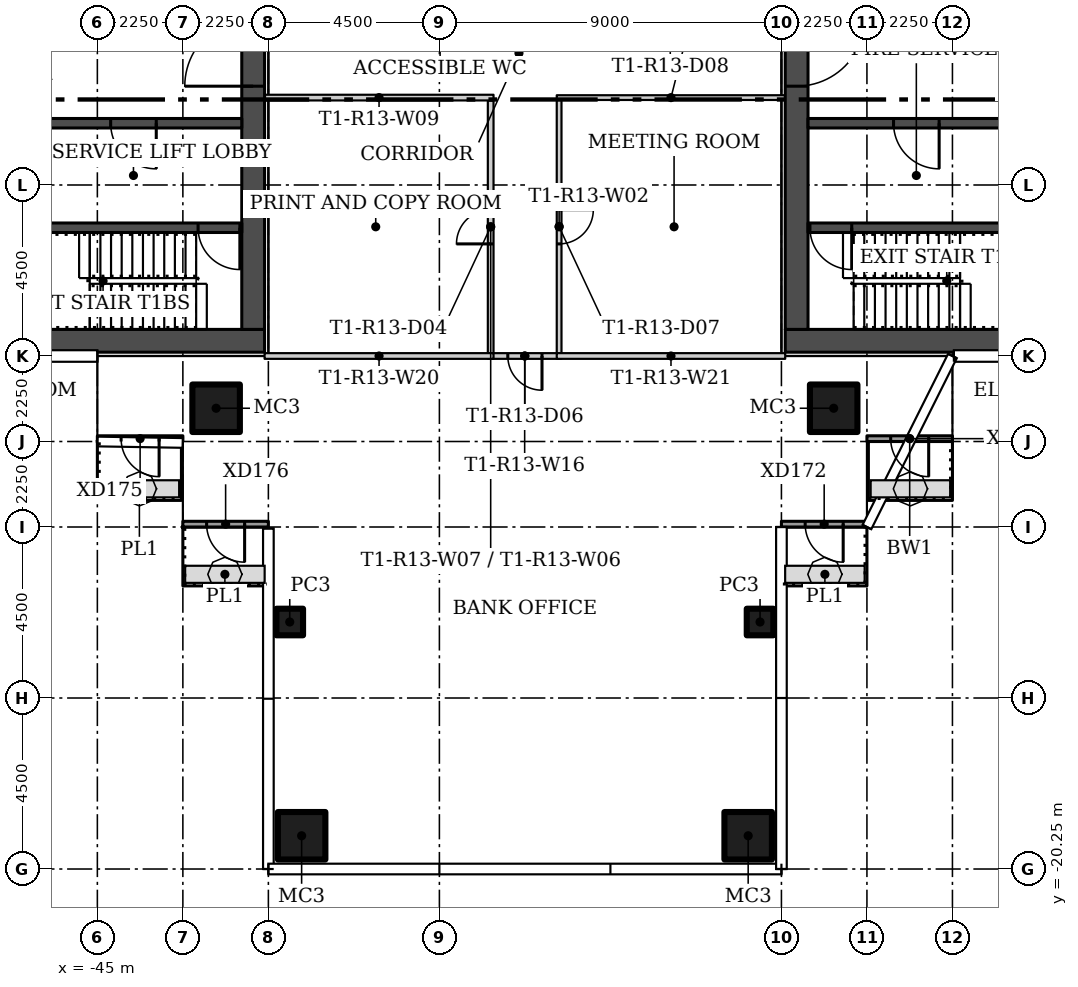
"""IFC4 building model, lengths in metres.
Left out: names, types, materials, properties, quantities, classifications, styles, units other than length and angle.
Written with IfcOpenShell. Run it as: python <this file> out.ifc"""

import sys

from ifc_helpers import new_model, si_unit, direction, frame, frame_2d, origin, origin_2d, place, context, subcontext, project, spatial, rectangle, hollow_rectangle, extrude, element, fill, save


model = new_model("IFC4")
c1 = context("Model", 3, precision=1e-05, world=origin(), true_north=direction((0.0, 1.0)))
c2 = subcontext(c1, "Body", "Model", "MODEL_VIEW")
j1 = project(units=[si_unit("LENGTHUNIT", "METRE"), si_unit("PLANEANGLEUNIT", "RADIAN")], contexts=[c1])
p1 = place(None, origin())
s1 = spatial("IfcSite", under=j1, at=p1, CompositionType="ELEMENT")
p2 = place(p1, origin())
s2 = spatial("IfcBuilding", under=s1, at=p2, CompositionType="ELEMENT")
p3 = place(p2, frame((0.0, 0.0, 120.9)))
s3 = spatial("IfcBuildingStorey", under=s2, at=p3, CompositionType="ELEMENT", Elevation=120.9)
for number, where in (
    (1, (-25.625, -8.125, 0.0)),
    (2, (-41.875, -8.125, 0.0)),
):
    element("IfcColumn", number, at=place(p3, frame(where)), inside=s3, PredefinedType="COLUMN", context=c2, shape_type="SweptSolid", body=[
        extrude(hollow_rectangle(XDim=1.25, YDim=1.25, WallThickness=0.05, at=origin_2d()), origin(), (0.0, 0.0, 1.0), 3.55),
    ])
p4 = place(p3, frame((-39.938, -13.75, 0.0)))
e3 = element("IfcColumn", 3, at=p4, inside=s3, PredefinedType="COLUMN", context=c2, shape_type="SweptSolid", body=[
    extrude(hollow_rectangle(XDim=0.7, YDim=0.7, WallThickness=0.025, at=origin_2d()), origin(), (0.0, 0.0, 1.0), 3.55),
])
p5 = place(p3, frame((-39.625, -19.375, 0.0)))
e4 = element("IfcColumn", 4, at=p5, inside=s3, PredefinedType="COLUMN", context=c2, shape_type="SweptSolid", body=[
    extrude(hollow_rectangle(XDim=1.25, YDim=1.25, WallThickness=0.05, at=origin_2d()), origin(), (0.0, 0.0, 1.0), 3.55),
])
p6 = place(p3, frame((-27.562, -13.75, 0.0)))
e5 = element("IfcColumn", 5, at=p6, inside=s3, PredefinedType="COLUMN", context=c2, shape_type="SweptSolid", body=[
    extrude(hollow_rectangle(XDim=0.7, YDim=0.7, WallThickness=0.025, at=origin_2d()), origin(), (0.0, 0.0, 1.0), 3.55),
])
p7 = place(p3, frame((-27.875, -19.375, 0.0)))
e6 = element("IfcColumn", 6, at=p7, inside=s3, PredefinedType="COLUMN", context=c2, shape_type="SweptSolid", body=[
    extrude(hollow_rectangle(XDim=1.25, YDim=1.25, WallThickness=0.05, at=origin_2d()), origin(), (0.0, 0.0, 1.0), 3.55),
])
p8 = place(p3, frame((-32.85, -0.013, 0.0), z_axis=(0.0, 0.0, 1.0), x_axis=(0.0, -1.0, 0.0)))
e7 = element("IfcWall", 7, at=p8, inside=s3, PredefinedType="PARTITIONING", context=c2, shape_type="SweptSolid", body=[
    extrude(rectangle(XDim=6.662, YDim=0.125, at=frame_2d((3.331, 0.0))), origin(), (0.0, 0.0, 1.0), 3.55),
])
p9 = place(p8, frame((2.887, 0.0, 0.0)))
e8 = element("IfcOpeningElement", 8, at=p9, cuts=e7, PredefinedType="OPENING", context=c2, shape_type="SweptSolid", body=[
    extrude(rectangle(XDim=0.9, YDim=2.1, at=frame_2d((0.45, 1.05))), frame((0.0, 0.073, 0.0), z_axis=(0.0, -1.0, 0.0), x_axis=(1.0, 0.0, 0.0)), (0.0, 0.0, 1.0), 0.145),
])
p10 = place(p3, frame((-26.9, 0.05, 0.0), z_axis=(0.0, 0.0, 1.0), x_axis=(-1.0, 0.0, 0.0)))
e9 = element("IfcWall", 9, at=p10, inside=s3, PredefinedType="PARTITIONING", context=c2, shape_type="SweptSolid", body=[
    extrude(rectangle(XDim=6.012, YDim=0.125, at=frame_2d((3.006, 0.0))), origin(), (0.0, 0.0, 1.0), 3.55),
])
p11 = place(p3, frame((-34.65, -6.675, 0.0), z_axis=(0.0, 0.0, 1.0), x_axis=(0.0, 1.0, 0.0)))
e10 = element("IfcWall", 10, at=p11, inside=s3, PredefinedType="PARTITIONING", context=c2, shape_type="SweptSolid", body=[
    extrude(rectangle(XDim=6.65, YDim=0.15, at=frame_2d((3.325, 0.0))), origin(), (0.0, 0.0, 1.0), 3.55),
])
p12 = place(p11, frame((2.875, 0.0, 0.0)))
e11 = element("IfcOpeningElement", 11, at=p12, cuts=e10, PredefinedType="OPENING", context=c2, shape_type="SweptSolid", body=[
    extrude(rectangle(XDim=0.9, YDim=2.1, at=frame_2d((0.45, 1.05))), frame((0.0, 0.085, 0.0), z_axis=(0.0, -1.0, 0.0), x_axis=(1.0, 0.0, 0.0)), (0.0, 0.0, 1.0), 0.17),
])
p13 = place(p3, frame((-34.575, 0.05, 0.0), z_axis=(0.0, 0.0, 1.0), x_axis=(-1.0, 0.0, 0.0)))
e12 = element("IfcWall", 12, at=p13, inside=s3, PredefinedType="PARTITIONING", context=c2, shape_type="SweptSolid", body=[
    extrude(rectangle(XDim=6.025, YDim=0.15, at=frame_2d((3.012, 0.0))), origin(), (0.0, 0.0, 1.0), 3.55),
])
p14 = place(p3, frame((-32.787, -6.75, 0.0), z_axis=(0.0, 0.0, 1.0), x_axis=(-1.0, 0.0, 0.0)))
e13 = element("IfcWall", 13, at=p14, inside=s3, PredefinedType="PARTITIONING", context=c2, shape_type="SweptSolid", body=[
    extrude(rectangle(XDim=1.938, YDim=0.15, at=frame_2d((0.969, 0.0))), origin(), (0.0, 0.0, 1.0), 3.55),
])
p15 = place(p14, frame((0.513, 0.0, 0.0)))
e14 = element("IfcOpeningElement", 14, at=p15, cuts=e13, PredefinedType="OPENING", context=c2, shape_type="SweptSolid", body=[
    extrude(rectangle(XDim=0.9, YDim=2.1, at=frame_2d((0.45, 1.05))), frame((0.0, 0.085, 0.0), z_axis=(0.0, -1.0, 0.0), x_axis=(1.0, 0.0, 0.0)), (0.0, 0.0, 1.0), 0.17),
])
p16 = place(p3, frame((-40.6, -6.75, 0.0)))
e15 = element("IfcWall", 15, at=p16, inside=s3, PredefinedType="PARTITIONING", context=c2, shape_type="SweptSolid", body=[
    extrude(rectangle(XDim=6.025, YDim=0.15, at=frame_2d((3.012, 0.0))), origin(), (0.0, 0.0, 1.0), 3.55),
])
p17 = place(p3, frame((-32.912, -6.75, 0.0)))
e16 = element("IfcWall", 16, at=p17, inside=s3, PredefinedType="PARTITIONING", context=c2, shape_type="SweptSolid", body=[
    extrude(rectangle(XDim=6.012, YDim=0.15, at=frame_2d((3.006, 0.0))), origin(), (0.0, 0.0, 1.0), 3.55),
])
p18 = place(p3, frame((-22.5, -8.925, 0.0), z_axis=(0.0, 0.0, 1.0), x_axis=(-1.0, 0.0, 0.0)))
e17 = element("IfcWall", 17, at=p18, inside=s3, PredefinedType="SOLIDWALL", context=c2, shape_type="SweptSolid", body=[
    extrude(rectangle(XDim=2.25, YDim=0.15, at=frame_2d((1.125, 0.0))), origin(), (0.0, 0.0, 1.0), 3.45),
])
p19 = place(p18, frame((0.625, 0.0, 0.0)))
e18 = element("IfcOpeningElement", 18, at=p19, cuts=e17, PredefinedType="OPENING", context=c2, shape_type="SweptSolid", body=[
    extrude(rectangle(XDim=1.0, YDim=2.4, at=frame_2d((0.5, 1.2))), frame((0.0, 0.085, 0.0), z_axis=(0.0, -1.0, 0.0), x_axis=(1.0, 0.0, 0.0)), (0.0, 0.0, 1.0), 0.17),
])
p20 = place(p3, frame((-24.75, -11.175, 0.0), z_axis=(0.0, 0.0, 1.0), x_axis=(-1.0, 0.0, 0.0)))
e19 = element("IfcWall", 19, at=p20, inside=s3, PredefinedType="SOLIDWALL", context=c2, shape_type="SweptSolid", body=[
    extrude(rectangle(XDim=2.25, YDim=0.15, at=frame_2d((1.125, 0.0))), origin(), (0.0, 0.0, 1.0), 3.45),
])
p21 = place(p20, frame((0.625, 0.0, 0.0)))
e20 = element("IfcOpeningElement", 20, at=p21, cuts=e19, PredefinedType="OPENING", context=c2, shape_type="SweptSolid", body=[
    extrude(rectangle(XDim=1.0, YDim=2.4, at=frame_2d((0.5, 1.2))), frame((0.0, 0.085, 0.0), z_axis=(0.0, -1.0, 0.0), x_axis=(1.0, 0.0, 0.0)), (0.0, 0.0, 1.0), 0.17),
])
p22 = place(p3, frame((-42.75, -8.925, 0.0), z_axis=(0.0, 0.0, 1.0), x_axis=(-1.0, 0.0, 0.0)))
e21 = element("IfcWall", 21, at=p22, inside=s3, PredefinedType="SOLIDWALL", context=c2, shape_type="SweptSolid", body=[
    extrude(rectangle(XDim=2.25, YDim=0.15, at=frame_2d((1.125, 0.0))), origin(), (0.0, 0.0, 1.0), 3.45),
])
p23 = place(p22, frame((0.625, 0.0, 0.0)))
e22 = element("IfcOpeningElement", 22, at=p23, cuts=e21, PredefinedType="OPENING", context=c2, shape_type="SweptSolid", body=[
    extrude(rectangle(XDim=1.0, YDim=2.4, at=frame_2d((0.5, 1.2))), frame((0.0, 0.085, 0.0), z_axis=(0.0, -1.0, 0.0), x_axis=(1.0, 0.0, 0.0)), (0.0, 0.0, 1.0), 0.17),
])
p24 = place(p3, frame((-40.5, -11.175, 0.0), z_axis=(0.0, 0.0, 1.0), x_axis=(-1.0, 0.0, 0.0)))
e23 = element("IfcWall", 23, at=p24, inside=s3, PredefinedType="SOLIDWALL", context=c2, shape_type="SweptSolid", body=[
    extrude(rectangle(XDim=2.25, YDim=0.15, at=frame_2d((1.125, 0.0))), origin(), (0.0, 0.0, 1.0), 3.45),
])
p25 = place(p24, frame((0.625, 0.0, 0.0)))
e24 = element("IfcOpeningElement", 24, at=p25, cuts=e23, PredefinedType="OPENING", context=c2, shape_type="SweptSolid", body=[
    extrude(rectangle(XDim=1.0, YDim=2.4, at=frame_2d((0.5, 1.2))), frame((0.0, 0.085, 0.0), z_axis=(0.0, -1.0, 0.0), x_axis=(1.0, 0.0, 0.0)), (0.0, 0.0, 1.0), 0.17),
])
p26 = place(p3, frame((-26.9, -6.35, 0.0)))
e25 = element("IfcWall", 25, at=p26, inside=s3, PredefinedType="SHEAR", context=c2, shape_type="SweptSolid", body=[
    extrude(rectangle(XDim=13.3, YDim=0.6, at=frame_2d((6.65, 0.0))), origin(), (0.0, 0.0, 1.0), 3.55),
])
p27 = place(p3, frame((-26.6, 6.05, 0.0), z_axis=(0.0, 0.0, 1.0), x_axis=(0.0, -1.0, 0.0)))
e26 = element("IfcWall", 26, at=p27, inside=s3, PredefinedType="SHEAR", context=c2, shape_type="SweptSolid", body=[
    extrude(rectangle(XDim=12.1, YDim=0.6, at=frame_2d((6.05, 0.0))), origin(), (0.0, 0.0, 1.0), 3.55),
])
p28 = place(p27, frame((3.9, 0.0, 0.0)))
e27 = element("IfcOpeningElement", 27, at=p28, cuts=e26, PredefinedType="OPENING", context=c2, shape_type="SweptSolid", body=[
    extrude(rectangle(XDim=1.8, YDim=2.4, at=frame_2d((0.9, 1.2))), frame((0.0, 0.31, 0.0), z_axis=(0.0, -1.0, 0.0), x_axis=(1.0, 0.0, 0.0)), (0.0, 0.0, 1.0), 0.62),
])
p29 = place(p3, frame((-14.2, -3.375, 0.0), z_axis=(0.0, 0.0, 1.0), x_axis=(-1.0, 0.0, 0.0)))
e28 = element("IfcWall", 28, at=p29, inside=s3, PredefinedType="SHEAR", context=c2, shape_type="SweptSolid", body=[
    extrude(rectangle(XDim=12.1, YDim=0.25, at=frame_2d((6.05, 0.0))), origin(), (0.0, 0.0, 1.0), 3.55),
])
p30 = place(p29, frame((10.95, 0.0, 0.0)))
e29 = element("IfcOpeningElement", 29, at=p30, cuts=e28, PredefinedType="OPENING", context=c2, shape_type="SweptSolid", body=[
    extrude(rectangle(XDim=1.1, YDim=2.1, at=frame_2d((0.55, 1.05))), frame((0.0, 0.135, 0.0), z_axis=(0.0, -1.0, 0.0), x_axis=(1.0, 0.0, 0.0)), (0.0, 0.0, 1.0), 0.27),
])
p31 = place(p3, frame((-14.2, -0.625, 0.0), z_axis=(0.0, 0.0, 1.0), x_axis=(-1.0, 0.0, 0.0)))
e30 = element("IfcWall", 30, at=p31, inside=s3, PredefinedType="SHEAR", context=c2, shape_type="SweptSolid", body=[
    extrude(rectangle(XDim=12.1, YDim=0.25, at=frame_2d((6.05, 0.0))), origin(), (0.0, 0.0, 1.0), 3.55),
])
p32 = place(p31, frame((8.65, 0.0, 0.0)))
e31 = element("IfcOpeningElement", 31, at=p32, cuts=e30, PredefinedType="OPENING", context=c2, shape_type="SweptSolid", body=[
    extrude(rectangle(XDim=1.2, YDim=2.1, at=frame_2d((0.6, 1.05))), frame((0.0, 0.135, 0.0), z_axis=(0.0, -1.0, 0.0), x_axis=(1.0, 0.0, 0.0)), (0.0, 0.0, 1.0), 0.27),
])
p33 = place(p31, frame((1.175, 0.0, 0.0)))
e32 = element("IfcOpeningElement", 32, at=p33, cuts=e30, PredefinedType="OPENING", context=c2, shape_type="SweptSolid", body=[
    extrude(rectangle(XDim=0.9, YDim=2.1, at=frame_2d((0.45, 1.05))), frame((0.0, 0.135, 0.0), z_axis=(0.0, -1.0, 0.0), x_axis=(1.0, 0.0, 0.0)), (0.0, 0.0, 1.0), 0.27),
])
p34 = place(p3, frame((-40.6, -6.35, 0.0), z_axis=(0.0, 0.0, 1.0), x_axis=(-1.0, 0.0, 0.0)))
e33 = element("IfcWall", 33, at=p34, inside=s3, PredefinedType="SHEAR", context=c2, shape_type="SweptSolid", body=[
    extrude(rectangle(XDim=13.3, YDim=0.6, at=frame_2d((6.65, 0.0))), origin(), (0.0, 0.0, 1.0), 3.55),
])
p35 = place(p3, frame((-40.9, -6.05, 0.0), z_axis=(0.0, 0.0, 1.0), x_axis=(0.0, 1.0, 0.0)))
e34 = element("IfcWall", 34, at=p35, inside=s3, PredefinedType="SHEAR", context=c2, shape_type="SweptSolid", body=[
    extrude(rectangle(XDim=12.1, YDim=0.6, at=frame_2d((6.05, 0.0))), origin(), (0.0, 0.0, 1.0), 3.55),
])
p36 = place(p35, frame((6.4, 0.0, 0.0)))
e35 = element("IfcOpeningElement", 35, at=p36, cuts=e34, PredefinedType="OPENING", context=c2, shape_type="SweptSolid", body=[
    extrude(rectangle(XDim=1.8, YDim=2.4, at=frame_2d((0.9, 1.2))), frame((0.0, 0.31, 0.0), z_axis=(0.0, -1.0, 0.0), x_axis=(1.0, 0.0, 0.0)), (0.0, 0.0, 1.0), 0.62),
])
p37 = place(p3, frame((-41.2, -3.375, 0.0), z_axis=(0.0, 0.0, 1.0), x_axis=(-1.0, 0.0, 0.0)))
e36 = element("IfcWall", 36, at=p37, inside=s3, PredefinedType="SHEAR", context=c2, shape_type="SweptSolid", body=[
    extrude(rectangle(XDim=12.1, YDim=0.25, at=frame_2d((6.05, 0.0))), origin(), (0.0, 0.0, 1.0), 3.55),
])
p38 = place(p37, frame((0.05, 0.0, 0.0)))
e37 = element("IfcOpeningElement", 37, at=p38, cuts=e36, PredefinedType="OPENING", context=c2, shape_type="SweptSolid", body=[
    extrude(rectangle(XDim=1.1, YDim=2.1, at=frame_2d((0.55, 1.05))), frame((0.0, 0.135, 0.0), z_axis=(0.0, -1.0, 0.0), x_axis=(1.0, 0.0, 0.0)), (0.0, 0.0, 1.0), 0.27),
])
p39 = place(p3, frame((-41.2, -0.625, 0.0), z_axis=(0.0, 0.0, 1.0), x_axis=(-1.0, 0.0, 0.0)))
e38 = element("IfcWall", 38, at=p39, inside=s3, PredefinedType="SHEAR", context=c2, shape_type="SweptSolid", body=[
    extrude(rectangle(XDim=12.1, YDim=0.25, at=frame_2d((6.05, 0.0))), origin(), (0.0, 0.0, 1.0), 3.55),
])
p40 = place(p39, frame((2.25, 0.0, 0.0)))
e39 = element("IfcOpeningElement", 39, at=p40, cuts=e38, PredefinedType="OPENING", context=c2, shape_type="SweptSolid", body=[
    extrude(rectangle(XDim=1.2, YDim=2.1, at=frame_2d((0.6, 1.05))), frame((0.0, 0.135, 0.0), z_axis=(0.0, -1.0, 0.0), x_axis=(1.0, 0.0, 0.0)), (0.0, 0.0, 1.0), 0.27),
])
p41 = place(p39, frame((9.5, 0.0, 0.0)))
e40 = element("IfcOpeningElement", 40, at=p41, cuts=e38, PredefinedType="OPENING", context=c2, shape_type="SweptSolid", body=[
    extrude(rectangle(XDim=0.9, YDim=2.1, at=frame_2d((0.45, 1.05))), frame((0.0, 0.135, 0.0), z_axis=(0.0, -1.0, 0.0), x_axis=(1.0, 0.0, 0.0)), (0.0, 0.0, 1.0), 0.27),
])
p42 = place(p39, frame((11.125, 0.0, 0.0)))
e41 = element("IfcOpeningElement", 41, at=p42, cuts=e38, PredefinedType="OPENING", context=c2, shape_type="SweptSolid", body=[
    extrude(rectangle(XDim=0.9, YDim=2.1, at=frame_2d((0.45, 1.05))), frame((0.0, 0.135, 0.0), z_axis=(0.0, -1.0, 0.0), x_axis=(1.0, 0.0, 0.0)), (0.0, 0.0, 1.0), 0.27),
])
p43 = place(p12, origin())
e42 = element("IfcDoor", 42, at=p43, inside=s3, OperationType="SINGLE_SWING_RIGHT", PredefinedType="DOOR", context=c2, shape_type="SweptSolid", body=[
    extrude(rectangle(XDim=0.9, YDim=2.1, at=frame_2d((0.45, 1.05))), frame((0.0, 0.025, 0.0), z_axis=(0.0, -1.0, 0.0), x_axis=(1.0, 0.0, 0.0)), (0.0, 0.0, 1.0), 0.05),
])
fill(e11, e42)
p44 = place(p15, origin())
e43 = element("IfcDoor", 43, at=p44, inside=s3, OperationType="SINGLE_SWING_RIGHT", PredefinedType="DOOR", context=c2, shape_type="SweptSolid", body=[
    extrude(rectangle(XDim=0.9, YDim=2.1, at=frame_2d((0.45, 1.05))), frame((0.0, 0.025, 0.0), z_axis=(0.0, -1.0, 0.0), x_axis=(1.0, 0.0, 0.0)), (0.0, 0.0, 1.0), 0.05),
])
fill(e14, e43)
p45 = place(p9, origin())
e44 = element("IfcDoor", 44, at=p45, inside=s3, OperationType="SINGLE_SWING_LEFT", PredefinedType="DOOR", context=c2, shape_type="SweptSolid", body=[
    extrude(rectangle(XDim=0.9, YDim=2.1, at=frame_2d((0.45, 1.05))), frame((0.0, 0.025, 0.0), z_axis=(0.0, -1.0, 0.0), x_axis=(1.0, 0.0, 0.0)), (0.0, 0.0, 1.0), 0.05),
])
fill(e8, e44)
p46 = place(p19, origin())
e45 = element("IfcDoor", 45, at=p46, inside=s3, OperationType="SINGLE_SWING_RIGHT", PredefinedType="DOOR", context=c2, shape_type="SweptSolid", body=[
    extrude(rectangle(XDim=1.0, YDim=2.4, at=frame_2d((0.5, 1.2))), frame((0.0, 0.025, 0.0), z_axis=(0.0, -1.0, 0.0), x_axis=(1.0, 0.0, 0.0)), (0.0, 0.0, 1.0), 0.05),
])
fill(e18, e45)
p47 = place(p21, origin())
e46 = element("IfcDoor", 46, at=p47, inside=s3, OperationType="SINGLE_SWING_LEFT", PredefinedType="DOOR", context=c2, shape_type="SweptSolid", body=[
    extrude(rectangle(XDim=1.0, YDim=2.4, at=frame_2d((0.5, 1.2))), frame((0.0, 0.025, 0.0), z_axis=(0.0, -1.0, 0.0), x_axis=(1.0, 0.0, 0.0)), (0.0, 0.0, 1.0), 0.05),
])
fill(e20, e46)
p48 = place(p23, origin())
e47 = element("IfcDoor", 47, at=p48, inside=s3, OperationType="SINGLE_SWING_LEFT", PredefinedType="DOOR", context=c2, shape_type="SweptSolid", body=[
    extrude(rectangle(XDim=1.0, YDim=2.4, at=frame_2d((0.5, 1.2))), frame((0.0, 0.025, 0.0), z_axis=(0.0, -1.0, 0.0), x_axis=(1.0, 0.0, 0.0)), (0.0, 0.0, 1.0), 0.05),
])
fill(e22, e47)
p49 = place(p25, origin())
e48 = element("IfcDoor", 48, at=p49, inside=s3, OperationType="SINGLE_SWING_RIGHT", PredefinedType="DOOR", context=c2, shape_type="SweptSolid", body=[
    extrude(rectangle(XDim=1.0, YDim=2.4, at=frame_2d((0.5, 1.2))), frame((0.0, 0.025, 0.0), z_axis=(0.0, -1.0, 0.0), x_axis=(1.0, 0.0, 0.0)), (0.0, 0.0, 1.0), 0.05),
])
fill(e24, e48)
p50 = place(p28, origin())
e49 = element("IfcDoor", 49, at=p50, inside=s3, OperationType="DOUBLE_DOOR_SINGLE_SWING", PredefinedType="DOOR", context=c2, shape_type="SweptSolid", body=[
    extrude(rectangle(XDim=1.8, YDim=2.4, at=frame_2d((0.9, 1.2))), frame((0.0, 0.025, 0.0), z_axis=(0.0, -1.0, 0.0), x_axis=(1.0, 0.0, 0.0)), (0.0, 0.0, 1.0), 0.05),
])
fill(e27, e49)
p51 = place(p30, origin())
e50 = element("IfcDoor", 50, at=p51, inside=s3, OperationType="SINGLE_SWING_RIGHT", PredefinedType="DOOR", context=c2, shape_type="SweptSolid", body=[
    extrude(rectangle(XDim=1.1, YDim=2.1, at=frame_2d((0.55, 1.05))), frame((0.0, 0.025, 0.0), z_axis=(0.0, -1.0, 0.0), x_axis=(1.0, 0.0, 0.0)), (0.0, 0.0, 1.0), 0.05),
])
fill(e29, e50)
p52 = place(p32, origin())
e51 = element("IfcDoor", 51, at=p52, inside=s3, OperationType="SINGLE_SWING_RIGHT", PredefinedType="DOOR", context=c2, shape_type="SweptSolid", body=[
    extrude(rectangle(XDim=1.2, YDim=2.1, at=frame_2d((0.6, 1.05))), frame((0.0, 0.025, 0.0), z_axis=(0.0, -1.0, 0.0), x_axis=(1.0, 0.0, 0.0)), (0.0, 0.0, 1.0), 0.05),
])
fill(e31, e51)
p53 = place(p36, origin())
e52 = element("IfcDoor", 52, at=p53, inside=s3, OperationType="DOUBLE_DOOR_SINGLE_SWING", PredefinedType="DOOR", context=c2, shape_type="SweptSolid", body=[
    extrude(rectangle(XDim=1.8, YDim=2.4, at=frame_2d((0.9, 1.2))), frame((0.0, 0.025, 0.0), z_axis=(0.0, -1.0, 0.0), x_axis=(1.0, 0.0, 0.0)), (0.0, 0.0, 1.0), 0.05),
])
fill(e35, e52)
p54 = place(p38, origin())
e53 = element("IfcDoor", 53, at=p54, inside=s3, OperationType="SINGLE_SWING_LEFT", PredefinedType="DOOR", context=c2, shape_type="SweptSolid", body=[
    extrude(rectangle(XDim=1.1, YDim=2.1, at=frame_2d((0.55, 1.05))), frame((0.0, 0.025, 0.0), z_axis=(0.0, -1.0, 0.0), x_axis=(1.0, 0.0, 0.0)), (0.0, 0.0, 1.0), 0.05),
])
fill(e37, e53)
p55 = place(p40, origin())
e54 = element("IfcDoor", 54, at=p55, inside=s3, OperationType="SINGLE_SWING_LEFT", PredefinedType="DOOR", context=c2, shape_type="SweptSolid", body=[
    extrude(rectangle(XDim=1.2, YDim=2.1, at=frame_2d((0.6, 1.05))), frame((0.0, 0.025, 0.0), z_axis=(0.0, -1.0, 0.0), x_axis=(1.0, 0.0, 0.0)), (0.0, 0.0, 1.0), 0.05),
])
fill(e39, e54)
save(model, sys.argv[1])
